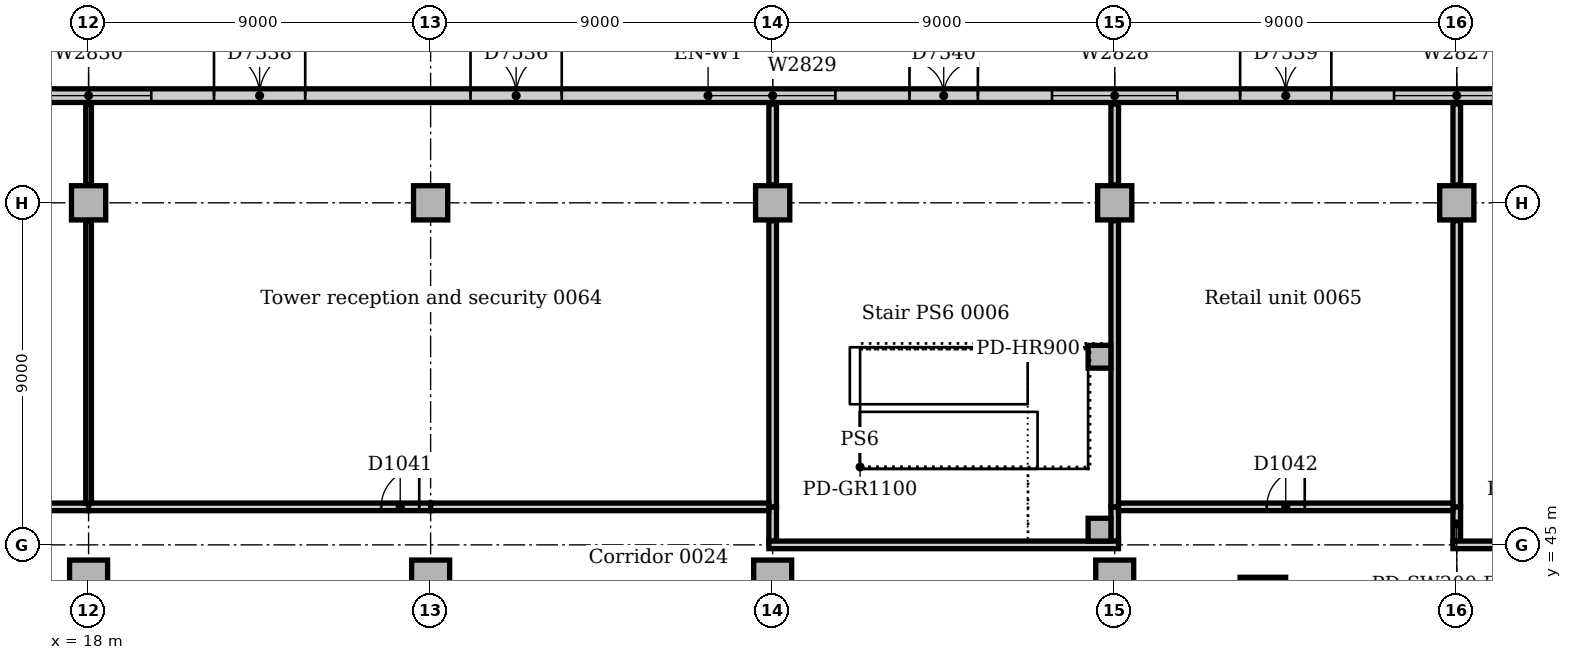
"""IFC4 building model, lengths in metres.
Left out: names, types, materials, properties, quantities, classifications, styles, units other than length and angle.
Written with IfcOpenShell. Run it as: python <this file> out.ifc"""

import sys

from ifc_helpers import new_model, si_unit, direction, frame, frame_2d, origin, origin_2d, place, context, subcontext, project, spatial, rectangle, extrude, element, fill, save


model = new_model("IFC4")
c1 = context("Model", 3, precision=1e-05, world=origin(), true_north=direction((0.0, 1.0)))
c2 = subcontext(c1, "Body", "Model", "MODEL_VIEW")
j1 = project(units=[si_unit("LENGTHUNIT", "METRE"), si_unit("PLANEANGLEUNIT", "RADIAN")], contexts=[c1])
p1 = place(None, origin())
s1 = spatial("IfcSite", under=j1, at=p1, CompositionType="ELEMENT")
p2 = place(p1, origin())
s2 = spatial("IfcBuilding", under=s1, at=p2, CompositionType="ELEMENT")
p3 = place(p2, origin())
s3 = spatial("IfcBuildingStorey", under=s2, at=p3, CompositionType="ELEMENT", Elevation=0.0)
p4 = place(p3, frame((48.898, 43.547, 0.0), z_axis=(0.0, 0.0, 1.0), x_axis=(1.0, 0.0, 0.0)))
e1 = element("IfcColumn", 1, at=p4, inside=s3, PredefinedType="COLUMN", context=c2, shape_type="SweptSolid", body=[
    extrude(rectangle(XDim=1.2, YDim=1.2, at=origin_2d()), origin(), (0.0, 0.0, 1.0), 5.7),
])
for number, where, z_axis, x_axis in (
    (2, (18.0, 44.1, 0.0), (0.0, 0.0, 1.0), (1.0, 0.0, 0.0)),
    (3, (27.0, 44.1, 0.0), (0.0, 0.0, 1.0), (1.0, 0.0, 0.0)),
    (4, (36.0, 44.1, 0.0), (0.0, 0.0, 1.0), (1.0, 0.0, 0.0)),
    (5, (45.0, 44.1, 0.0), (0.0, 0.0, 1.0), (1.0, 0.0, 0.0)),
):
    element("IfcColumn", number, at=place(p3, frame(where, z_axis=z_axis, x_axis=x_axis)), inside=s3, PredefinedType="COLUMN", context=c2, shape_type="SweptSolid", body=[
        extrude(rectangle(XDim=1.0, YDim=1.0, at=origin_2d()), origin(), (0.0, 0.0, 1.0), 5.7),
    ])
for number, where, z_axis, x_axis in (
    (6, (18.0, 54.0, 0.0), (0.0, 0.0, 1.0), (1.0, 0.0, 0.0)),
    (7, (27.0, 54.0, 0.0), (0.0, 0.0, 1.0), (1.0, 0.0, 0.0)),
    (8, (36.0, 54.0, 0.0), (0.0, 0.0, 1.0), (1.0, 0.0, 0.0)),
    (9, (45.0, 54.0, 0.0), (0.0, 0.0, 1.0), (1.0, 0.0, 0.0)),
    (10, (54.0, 54.0, 0.0), (0.0, 0.0, 1.0), (1.0, 0.0, 0.0)),
):
    element("IfcColumn", number, at=place(p3, frame(where, z_axis=z_axis, x_axis=x_axis)), inside=s3, PredefinedType="COLUMN", context=c2, shape_type="SweptSolid", body=[
        extrude(rectangle(XDim=0.9, YDim=0.9, at=origin_2d()), origin(), (0.0, 0.0, 1.0), 5.7),
    ])
p5 = place(p3, frame((63.0, 56.82, 0.0), z_axis=(0.0, 0.0, 1.0), x_axis=(-1.0, 0.0, 0.0)))
e11 = element("IfcWall", 11, at=p5, inside=s3, PredefinedType="STANDARD", context=c2, shape_type="SweptSolid", body=[
    extrude(rectangle(XDim=57.4, YDim=0.36, at=frame_2d((28.7, 0.0))), origin(), (0.0, 0.0, 1.0), 5.7),
])
p6 = place(p5, frame((32.55, 0.0, 0.0)))
e12 = element("IfcOpeningElement", 12, at=p6, cuts=e11, PredefinedType="OPENING", context=c2, shape_type="SweptSolid", body=[
    extrude(rectangle(XDim=2.4, YDim=2.4, at=frame_2d((1.2, 1.2))), frame((0.0, 0.19, 0.0), z_axis=(0.0, -1.0, 0.0), x_axis=(1.0, 0.0, 0.0)), (0.0, 0.0, 1.0), 0.38),
])
p7 = place(p5, frame((48.3, 0.0, 0.0)))
e13 = element("IfcOpeningElement", 13, at=p7, cuts=e11, PredefinedType="OPENING", context=c2, shape_type="SweptSolid", body=[
    extrude(rectangle(XDim=2.4, YDim=2.2, at=frame_2d((1.2, 1.1))), frame((0.0, 0.19, 0.0), z_axis=(0.0, -1.0, 0.0), x_axis=(1.0, 0.0, 0.0)), (0.0, 0.0, 1.0), 0.38),
])
p8 = place(p5, frame((39.3, 0.0, 0.0)))
e14 = element("IfcOpeningElement", 14, at=p8, cuts=e11, PredefinedType="OPENING", context=c2, shape_type="SweptSolid", body=[
    extrude(rectangle(XDim=2.4, YDim=2.2, at=frame_2d((1.2, 1.1))), frame((0.0, 0.19, 0.0), z_axis=(0.0, -1.0, 0.0), x_axis=(1.0, 0.0, 0.0)), (0.0, 0.0, 1.0), 0.38),
])
p9 = place(p5, frame((12.3, 0.0, 0.0)))
e15 = element("IfcOpeningElement", 15, at=p9, cuts=e11, PredefinedType="OPENING", context=c2, shape_type="SweptSolid", body=[
    extrude(rectangle(XDim=2.4, YDim=2.2, at=frame_2d((1.2, 1.1))), frame((0.0, 0.19, 0.0), z_axis=(0.0, -1.0, 0.0), x_axis=(1.0, 0.0, 0.0)), (0.0, 0.0, 1.0), 0.38),
])
p10 = place(p5, frame((21.6, 0.0, 0.0)))
e16 = element("IfcOpeningElement", 16, at=p10, cuts=e11, PredefinedType="OPENING", context=c2, shape_type="SweptSolid", body=[
    extrude(rectangle(XDim=1.8, YDim=2.2, at=frame_2d((0.9, 1.1))), frame((0.0, 0.19, 0.0), z_axis=(0.0, -1.0, 0.0), x_axis=(1.0, 0.0, 0.0)), (0.0, 0.0, 1.0), 0.38),
])
p11 = place(p5, frame((2.1, 0.0, 0.0)))
e17 = element("IfcOpeningElement", 17, at=p11, cuts=e11, PredefinedType="OPENING", context=c2, shape_type="SweptSolid", body=[
    extrude(rectangle(XDim=1.8, YDim=2.2, at=frame_2d((0.9, 1.1))), frame((0.0, 0.19, 0.0), z_axis=(0.0, -1.0, 0.0), x_axis=(1.0, 0.0, 0.0)), (0.0, 0.0, 1.0), 0.38),
])
p12 = place(p5, frame((7.35, 0.0, 0.6)))
e18 = element("IfcOpeningElement", 18, at=p12, cuts=e11, PredefinedType="OPENING", context=c2, shape_type="SweptSolid", body=[
    extrude(rectangle(XDim=3.3, YDim=3.0, at=frame_2d((1.65, 1.5))), frame((0.0, 0.19, 0.0), z_axis=(0.0, -1.0, 0.0), x_axis=(1.0, 0.0, 0.0)), (0.0, 0.0, 1.0), 0.38),
])
p13 = place(p5, frame((16.35, 0.0, 0.6)))
e19 = element("IfcOpeningElement", 19, at=p13, cuts=e11, PredefinedType="OPENING", context=c2, shape_type="SweptSolid", body=[
    extrude(rectangle(XDim=3.3, YDim=3.0, at=frame_2d((1.65, 1.5))), frame((0.0, 0.19, 0.0), z_axis=(0.0, -1.0, 0.0), x_axis=(1.0, 0.0, 0.0)), (0.0, 0.0, 1.0), 0.38),
])
p14 = place(p5, frame((25.35, 0.0, 0.6)))
e20 = element("IfcOpeningElement", 20, at=p14, cuts=e11, PredefinedType="OPENING", context=c2, shape_type="SweptSolid", body=[
    extrude(rectangle(XDim=3.3, YDim=3.0, at=frame_2d((1.65, 1.5))), frame((0.0, 0.19, 0.0), z_axis=(0.0, -1.0, 0.0), x_axis=(1.0, 0.0, 0.0)), (0.0, 0.0, 1.0), 0.38),
])
p15 = place(p5, frame((43.35, 0.0, 0.6)))
e21 = element("IfcOpeningElement", 21, at=p15, cuts=e11, PredefinedType="OPENING", context=c2, shape_type="SweptSolid", body=[
    extrude(rectangle(XDim=3.3, YDim=3.0, at=frame_2d((1.65, 1.5))), frame((0.0, 0.19, 0.0), z_axis=(0.0, -1.0, 0.0), x_axis=(1.0, 0.0, 0.0)), (0.0, 0.0, 1.0), 0.38),
])
p16 = place(p5, frame((52.35, 0.0, 0.6)))
e22 = element("IfcOpeningElement", 22, at=p16, cuts=e11, PredefinedType="OPENING", context=c2, shape_type="SweptSolid", body=[
    extrude(rectangle(XDim=3.3, YDim=3.0, at=frame_2d((1.65, 1.5))), frame((0.0, 0.19, 0.0), z_axis=(0.0, -1.0, 0.0), x_axis=(1.0, 0.0, 0.0)), (0.0, 0.0, 1.0), 0.38),
])
for number, where, z_axis, x_axis in (
    (23, (44.6, 49.95, 0.0), (0.0, 0.0, 1.0), (1.0, 0.0, 0.0)),
    (24, (44.6, 45.4, 0.0), (0.0, 0.0, 1.0), (1.0, 0.0, 0.0)),
):
    element("IfcColumn", number, at=place(p3, frame(where, z_axis=z_axis, x_axis=x_axis)), inside=s3, PredefinedType="COLUMN", context=c2, shape_type="SweptSolid", body=[
        extrude(rectangle(XDim=0.6, YDim=0.6, at=origin_2d()), origin(), (0.0, 0.0, 1.0), 6.0),
    ])
p17 = place(p3, frame((54.0, 45.1, 0.0), z_axis=(0.0, 0.0, 1.0), x_axis=(0.0, 1.0, 0.0)))
e25 = element("IfcWall", 25, at=p17, inside=s3, PredefinedType="SOLIDWALL", context=c2, shape_type="SweptSolid", body=[
    extrude(rectangle(XDim=0.9, YDim=0.2, at=frame_2d((0.45, 0.0))), origin(), (0.0, 0.0, 1.0), 5.7),
])
p18 = place(p3, frame((53.9, 45.0, 0.0), z_axis=(0.0, 0.0, 1.0), x_axis=(1.0, 0.0, 0.0)))
e26 = element("IfcWall", 26, at=p18, inside=s3, PredefinedType="SOLIDWALL", context=c2, shape_type="SweptSolid", body=[
    extrude(rectangle(XDim=8.63, YDim=0.2, at=frame_2d((4.315, 0.0))), origin(), (0.0, 0.0, 1.0), 5.7),
])
p19 = place(p3, frame((54.0, 46.0, 0.0), z_axis=(0.0, 0.0, 1.0), x_axis=(0.0, 1.0, 0.0)))
e27 = element("IfcWall", 27, at=p19, inside=s3, PredefinedType="SOLIDWALL", context=c2, shape_type="SweptSolid", body=[
    extrude(rectangle(XDim=7.53, YDim=0.2, at=frame_2d((3.765, 0.0))), origin(), (0.0, 0.0, 1.0), 5.7),
])
p20 = place(p3, frame((54.0, 54.47, 0.0), z_axis=(0.0, 0.0, 1.0), x_axis=(0.0, 1.0, 0.0)))
e28 = element("IfcWall", 28, at=p20, inside=s3, PredefinedType="SOLIDWALL", context=c2, shape_type="SweptSolid", body=[
    extrude(rectangle(XDim=2.13, YDim=0.2, at=frame_2d((1.065, 0.0))), origin(), (0.0, 0.0, 1.0), 5.7),
])
for number, where, z_axis, x_axis in (
    (29, (36.0, 45.1, 0.0), (0.0, 0.0, 1.0), (0.0, 1.0, 0.0)),
    (30, (45.0, 45.1, 0.0), (0.0, 0.0, 1.0), (0.0, 1.0, 0.0)),
):
    element("IfcWall", number, at=place(p3, frame(where, z_axis=z_axis, x_axis=x_axis)), inside=s3, PredefinedType="SOLIDWALL", context=c2, shape_type="SweptSolid", body=[
        extrude(rectangle(XDim=0.9, YDim=0.2, at=frame_2d((0.45, 0.0))), origin(), (0.0, 0.0, 1.0), 5.7),
    ])
p21 = place(p3, frame((35.9, 45.0, 0.0), z_axis=(0.0, 0.0, 1.0), x_axis=(1.0, 0.0, 0.0)))
e31 = element("IfcWall", 31, at=p21, inside=s3, PredefinedType="SOLIDWALL", context=c2, shape_type="SweptSolid", body=[
    extrude(rectangle(XDim=9.2, YDim=0.2, at=frame_2d((4.6, 0.0))), origin(), (0.0, 0.0, 1.0), 5.7),
])
p22 = place(p3, frame((36.0, 46.0, 0.0), z_axis=(0.0, 0.0, 1.0), x_axis=(0.0, 1.0, 0.0)))
e32 = element("IfcWall", 32, at=p22, inside=s3, PredefinedType="SOLIDWALL", context=c2, shape_type="SweptSolid", body=[
    extrude(rectangle(XDim=7.53, YDim=0.2, at=frame_2d((3.765, 0.0))), origin(), (0.0, 0.0, 1.0), 5.7),
])
p23 = place(p3, frame((36.0, 54.47, 0.0), z_axis=(0.0, 0.0, 1.0), x_axis=(0.0, 1.0, 0.0)))
e33 = element("IfcWall", 33, at=p23, inside=s3, PredefinedType="SOLIDWALL", context=c2, shape_type="SweptSolid", body=[
    extrude(rectangle(XDim=2.13, YDim=0.2, at=frame_2d((1.065, 0.0))), origin(), (0.0, 0.0, 1.0), 5.7),
])
p24 = place(p3, frame((45.0, 46.0, 0.0), z_axis=(0.0, 0.0, 1.0), x_axis=(0.0, 1.0, 0.0)))
e34 = element("IfcWall", 34, at=p24, inside=s3, PredefinedType="SOLIDWALL", context=c2, shape_type="SweptSolid", body=[
    extrude(rectangle(XDim=7.53, YDim=0.2, at=frame_2d((3.765, 0.0))), origin(), (0.0, 0.0, 1.0), 5.7),
])
p25 = place(p3, frame((45.0, 54.47, 0.0), z_axis=(0.0, 0.0, 1.0), x_axis=(0.0, 1.0, 0.0)))
e35 = element("IfcWall", 35, at=p25, inside=s3, PredefinedType="SOLIDWALL", context=c2, shape_type="SweptSolid", body=[
    extrude(rectangle(XDim=2.13, YDim=0.2, at=frame_2d((1.065, 0.0))), origin(), (0.0, 0.0, 1.0), 5.7),
])
p26 = place(p3, frame((9.0, 46.0, 0.0), z_axis=(0.0, 0.0, 1.0), x_axis=(1.0, 0.0, 0.0)))
e36 = element("IfcWall", 36, at=p26, inside=s3, PredefinedType="PARTITIONING", context=c2, shape_type="SweptSolid", body=[
    extrude(rectangle(XDim=9.0, YDim=0.2, at=frame_2d((4.5, 0.0))), origin(), (0.0, 0.0, 1.0), 5.7),
])
p27 = place(p26, frame((4.0, 0.0, 0.0)))
e37 = element("IfcOpeningElement", 37, at=p27, cuts=e36, PredefinedType="OPENING", context=c2, shape_type="SweptSolid", body=[
    extrude(rectangle(XDim=1.0, YDim=2.1, at=frame_2d((0.5, 1.05))), frame((0.0, 0.11, 0.0), z_axis=(0.0, -1.0, 0.0), x_axis=(1.0, 0.0, 0.0)), (0.0, 0.0, 1.0), 0.22),
])
p28 = place(p3, frame((18.0, 46.0, 0.0), z_axis=(0.0, 0.0, 1.0), x_axis=(1.0, 0.0, 0.0)))
e38 = element("IfcWall", 38, at=p28, inside=s3, PredefinedType="PARTITIONING", context=c2, shape_type="SweptSolid", body=[
    extrude(rectangle(XDim=9.0, YDim=0.2, at=frame_2d((4.5, 0.0))), origin(), (0.0, 0.0, 1.0), 5.7),
])
p29 = place(p28, frame((7.7, 0.0, 0.0)))
e39 = element("IfcOpeningElement", 39, at=p29, cuts=e38, PredefinedType="OPENING", context=c2, shape_type="SweptSolid", body=[
    extrude(rectangle(XDim=1.0, YDim=2.1, at=frame_2d((0.5, 1.05))), frame((0.0, 0.11, 0.0), z_axis=(0.0, -1.0, 0.0), x_axis=(1.0, 0.0, 0.0)), (0.0, 0.0, 1.0), 0.22),
])
p30 = place(p3, frame((27.0, 46.0, 0.0), z_axis=(0.0, 0.0, 1.0), x_axis=(1.0, 0.0, 0.0)))
e40 = element("IfcWall", 40, at=p30, inside=s3, PredefinedType="PARTITIONING", context=c2, shape_type="SweptSolid", body=[
    extrude(rectangle(XDim=8.9, YDim=0.2, at=frame_2d((4.45, 0.0))), origin(), (0.0, 0.0, 1.0), 5.7),
])
p31 = place(p3, frame((45.1, 46.0, 0.0), z_axis=(0.0, 0.0, 1.0), x_axis=(1.0, 0.0, 0.0)))
e41 = element("IfcWall", 41, at=p31, inside=s3, PredefinedType="PARTITIONING", context=c2, shape_type="SweptSolid", body=[
    extrude(rectangle(XDim=8.8, YDim=0.2, at=frame_2d((4.4, 0.0))), origin(), (0.0, 0.0, 1.0), 5.7),
])
p32 = place(p31, frame((3.9, 0.0, 0.0)))
e42 = element("IfcOpeningElement", 42, at=p32, cuts=e41, PredefinedType="OPENING", context=c2, shape_type="SweptSolid", body=[
    extrude(rectangle(XDim=1.0, YDim=2.1, at=frame_2d((0.5, 1.05))), frame((0.0, 0.11, 0.0), z_axis=(0.0, -1.0, 0.0), x_axis=(1.0, 0.0, 0.0)), (0.0, 0.0, 1.0), 0.22),
])
p33 = place(p3, frame((18.0, 46.1, 0.0), z_axis=(0.0, 0.0, 1.0), x_axis=(0.0, 1.0, 0.0)))
e43 = element("IfcWall", 43, at=p33, inside=s3, PredefinedType="PARTITIONING", context=c2, shape_type="SweptSolid", body=[
    extrude(rectangle(XDim=7.43, YDim=0.15, at=frame_2d((3.715, 0.0))), origin(), (0.0, 0.0, 1.0), 5.7),
])
p34 = place(p3, frame((18.0, 54.47, 0.0), z_axis=(0.0, 0.0, 1.0), x_axis=(0.0, 1.0, 0.0)))
e44 = element("IfcWall", 44, at=p34, inside=s3, PredefinedType="PARTITIONING", context=c2, shape_type="SweptSolid", body=[
    extrude(rectangle(XDim=2.13, YDim=0.15, at=frame_2d((1.065, 0.0))), origin(), (0.0, 0.0, 1.0), 5.7),
])
p35 = place(p6, frame((2.4, 0.0, 0.0), z_axis=(0.0, 0.0, 1.0), x_axis=(-1.0, 0.0, 0.0)))
e45 = element("IfcDoor", 45, at=p35, inside=s3, OperationType="DOUBLE_DOOR_SINGLE_SWING", PredefinedType="DOOR", context=c2, shape_type="SweptSolid", body=[
    extrude(rectangle(XDim=2.4, YDim=2.4, at=frame_2d((1.2, 1.2))), frame((0.0, -0.07, 0.0), z_axis=(0.0, -1.0, 0.0), x_axis=(1.0, 0.0, 0.0)), (0.0, 0.0, 1.0), 0.05),
])
fill(e12, e45)
p36 = place(p8, frame((2.4, 0.0, 0.0), z_axis=(0.0, 0.0, 1.0), x_axis=(-1.0, 0.0, 0.0)))
e46 = element("IfcDoor", 46, at=p36, inside=s3, OperationType="DOUBLE_DOOR_SINGLE_SWING", PredefinedType="DOOR", context=c2, shape_type="SweptSolid", body=[
    extrude(rectangle(XDim=2.4, YDim=2.2, at=frame_2d((1.2, 1.1))), frame((0.0, -0.07, 0.0), z_axis=(0.0, -1.0, 0.0), x_axis=(1.0, 0.0, 0.0)), (0.0, 0.0, 1.0), 0.05),
])
fill(e14, e46)
p37 = place(p9, frame((2.4, 0.0, 0.0), z_axis=(0.0, 0.0, 1.0), x_axis=(-1.0, 0.0, 0.0)))
e47 = element("IfcDoor", 47, at=p37, inside=s3, OperationType="DOUBLE_DOOR_SINGLE_SWING", PredefinedType="DOOR", context=c2, shape_type="SweptSolid", body=[
    extrude(rectangle(XDim=2.4, YDim=2.2, at=frame_2d((1.2, 1.1))), frame((0.0, -0.07, 0.0), z_axis=(0.0, -1.0, 0.0), x_axis=(1.0, 0.0, 0.0)), (0.0, 0.0, 1.0), 0.05),
])
fill(e15, e47)
p38 = place(p10, frame((1.8, 0.0, 0.0), z_axis=(0.0, 0.0, 1.0), x_axis=(-1.0, 0.0, 0.0)))
e48 = element("IfcDoor", 48, at=p38, inside=s3, OperationType="DOUBLE_DOOR_SINGLE_SWING", PredefinedType="DOOR", context=c2, shape_type="SweptSolid", body=[
    extrude(rectangle(XDim=1.8, YDim=2.2, at=frame_2d((0.9, 1.1))), frame((0.0, -0.07, 0.0), z_axis=(0.0, -1.0, 0.0), x_axis=(1.0, 0.0, 0.0)), (0.0, 0.0, 1.0), 0.05),
])
fill(e16, e48)
p39 = place(p12, origin())
e49 = element("IfcWindow", 49, at=p39, inside=s3, PartitioningType="SINGLE_PANEL", PredefinedType="WINDOW", context=c2, shape_type="SweptSolid", body=[
    extrude(rectangle(XDim=3.3, YDim=3.0, at=frame_2d((1.65, 1.5))), frame((0.0, 0.13, 0.0), z_axis=(0.0, -1.0, 0.0), x_axis=(1.0, 0.0, 0.0)), (0.0, 0.0, 1.0), 0.06),
])
fill(e18, e49)
p40 = place(p13, origin())
e50 = element("IfcWindow", 50, at=p40, inside=s3, PartitioningType="SINGLE_PANEL", PredefinedType="WINDOW", context=c2, shape_type="SweptSolid", body=[
    extrude(rectangle(XDim=3.3, YDim=3.0, at=frame_2d((1.65, 1.5))), frame((0.0, 0.13, 0.0), z_axis=(0.0, -1.0, 0.0), x_axis=(1.0, 0.0, 0.0)), (0.0, 0.0, 1.0), 0.06),
])
fill(e19, e50)
p41 = place(p14, origin())
e51 = element("IfcWindow", 51, at=p41, inside=s3, PartitioningType="SINGLE_PANEL", PredefinedType="WINDOW", context=c2, shape_type="SweptSolid", body=[
    extrude(rectangle(XDim=3.3, YDim=3.0, at=frame_2d((1.65, 1.5))), frame((0.0, 0.13, 0.0), z_axis=(0.0, -1.0, 0.0), x_axis=(1.0, 0.0, 0.0)), (0.0, 0.0, 1.0), 0.06),
])
fill(e20, e51)
p42 = place(p15, origin())
e52 = element("IfcWindow", 52, at=p42, inside=s3, PartitioningType="SINGLE_PANEL", PredefinedType="WINDOW", context=c2, shape_type="SweptSolid", body=[
    extrude(rectangle(XDim=3.3, YDim=3.0, at=frame_2d((1.65, 1.5))), frame((0.0, 0.13, 0.0), z_axis=(0.0, -1.0, 0.0), x_axis=(1.0, 0.0, 0.0)), (0.0, 0.0, 1.0), 0.06),
])
fill(e21, e52)
p43 = place(p29, origin())
e53 = element("IfcDoor", 53, at=p43, inside=s3, OperationType="SINGLE_SWING_RIGHT", PredefinedType="DOOR", context=c2, shape_type="SweptSolid", body=[
    extrude(rectangle(XDim=1.0, YDim=2.1, at=frame_2d((0.5, 1.05))), frame((0.0, 0.025, 0.0), z_axis=(0.0, -1.0, 0.0), x_axis=(1.0, 0.0, 0.0)), (0.0, 0.0, 1.0), 0.05),
])
fill(e39, e53)
p44 = place(p32, origin())
e54 = element("IfcDoor", 54, at=p44, inside=s3, OperationType="SINGLE_SWING_RIGHT", PredefinedType="DOOR", context=c2, shape_type="SweptSolid", body=[
    extrude(rectangle(XDim=1.0, YDim=2.1, at=frame_2d((0.5, 1.05))), frame((0.0, 0.025, 0.0), z_axis=(0.0, -1.0, 0.0), x_axis=(1.0, 0.0, 0.0)), (0.0, 0.0, 1.0), 0.05),
])
fill(e42, e54)
save(model, sys.argv[1])
